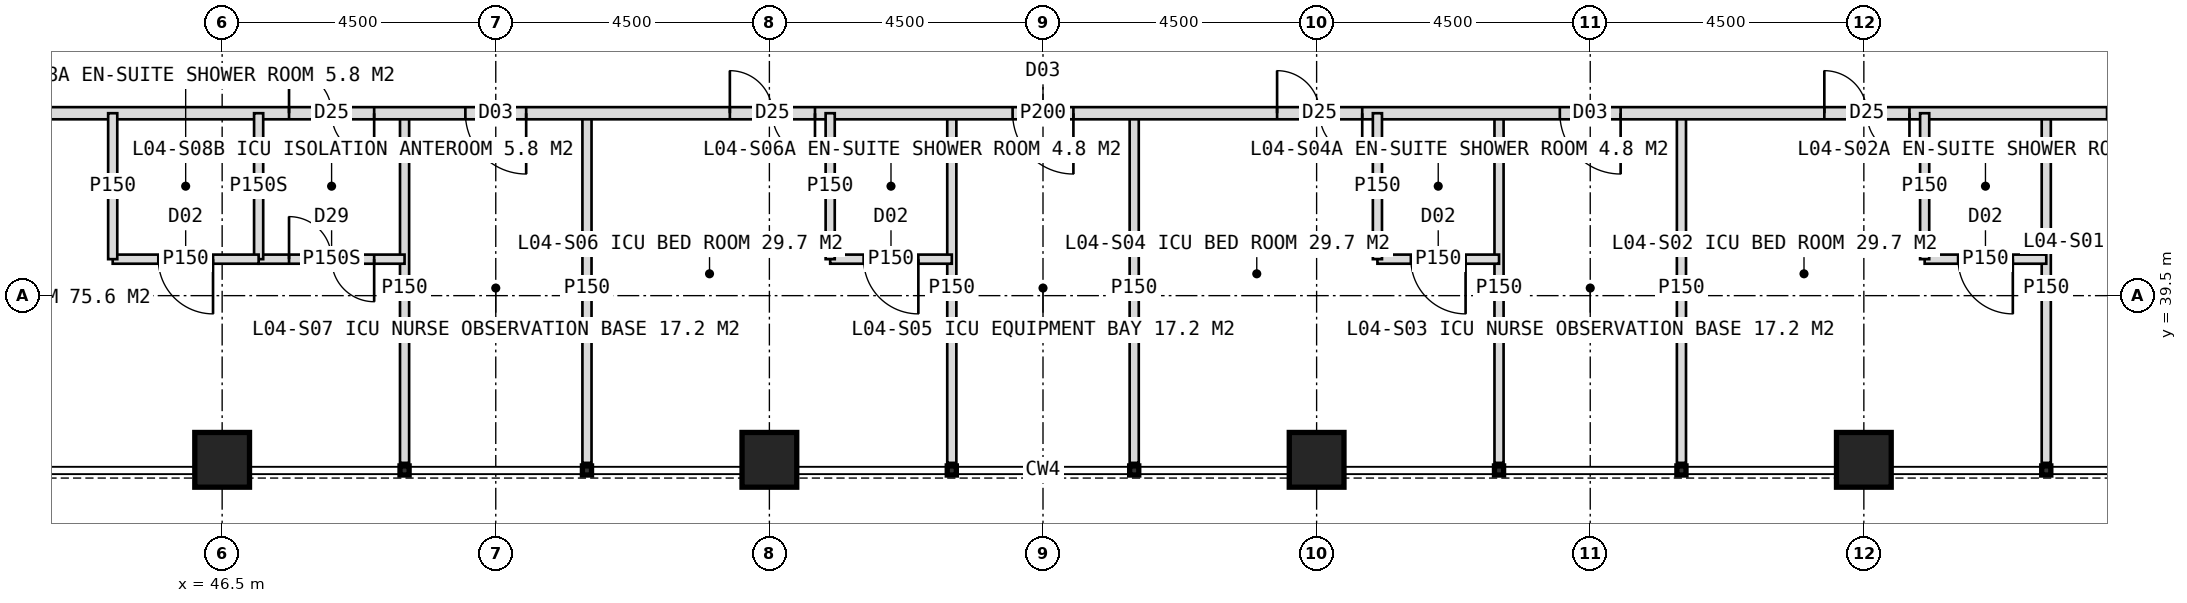
"""IFC4 building model, lengths in metres.
Left out: names, types, materials, properties, quantities, classifications, styles, units other than length and angle.
Written with IfcOpenShell. Run it as: python <this file> out.ifc"""

import sys

from ifc_helpers import new_model, si_unit, direction, frame, frame_2d, origin, origin_2d, place, context, subcontext, project, spatial, rectangle, hollow_rectangle, extrude, element, fill, save


model = new_model("IFC4")
c1 = context("Model", 3, precision=1e-05, world=origin(), true_north=direction((0.0, 1.0)))
c2 = subcontext(c1, "Body", "Model", "MODEL_VIEW")
j1 = project(units=[si_unit("LENGTHUNIT", "METRE"), si_unit("PLANEANGLEUNIT", "RADIAN")], contexts=[c1])
p1 = place(None, origin())
s1 = spatial("IfcSite", under=j1, at=p1, CompositionType="ELEMENT")
p2 = place(p1, origin())
s2 = spatial("IfcBuilding", under=s1, at=p2, CompositionType="ELEMENT")
p3 = place(p2, frame((0.0, 0.0, 21.0)))
s3 = spatial("IfcBuildingStorey", under=s2, at=p3, CompositionType="ELEMENT", Elevation=21.0)
for number, where, z_axis, x_axis in (
    (1, (46.5, 36.8, 0.0), (0.0, 0.0, 1.0), (1.0, 0.0, 0.0)),
    (2, (55.5, 36.8, 0.0), (0.0, 0.0, 1.0), (1.0, 0.0, 0.0)),
    (3, (64.5, 36.8, 0.0), (0.0, 0.0, 1.0), (1.0, 0.0, 0.0)),
    (4, (73.5, 36.8, 0.0), (0.0, 0.0, 1.0), (1.0, 0.0, 0.0)),
):
    element("IfcColumn", number, at=place(p3, frame(where, z_axis=z_axis, x_axis=x_axis)), inside=s3, PredefinedType="COLUMN", context=c2, shape_type="SweptSolid", body=[
        extrude(hollow_rectangle(XDim=0.9, YDim=0.9, WallThickness=0.08, at=origin_2d()), origin(), (0.0, 0.0, 1.0), 5.0),
    ])
for number, where, z_axis, x_axis in (
    (5, (76.5, 42.5, 0.0), (0.0, 0.0, 1.0), (0.0, -1.0, 0.0)),
    (6, (70.5, 42.5, 0.0), (0.0, 0.0, 1.0), (0.0, -1.0, 0.0)),
    (7, (67.5, 42.5, 0.0), (0.0, 0.0, 1.0), (0.0, -1.0, 0.0)),
    (8, (61.5, 42.5, 0.0), (0.0, 0.0, 1.0), (0.0, -1.0, 0.0)),
    (9, (58.5, 42.5, 0.0), (0.0, 0.0, 1.0), (0.0, -1.0, 0.0)),
    (10, (52.5, 42.5, 0.0), (0.0, 0.0, 1.0), (0.0, -1.0, 0.0)),
    (11, (49.5, 42.5, 0.0), (0.0, 0.0, 1.0), (0.0, -1.0, 0.0)),
):
    element("IfcWall", number, at=place(p3, frame(where, z_axis=z_axis, x_axis=x_axis)), inside=s3, PredefinedType="PARTITIONING", context=c2, shape_type="SweptSolid", body=[
        extrude(rectangle(XDim=5.75, YDim=0.15, at=frame_2d((2.875, 0.0))), origin(), (0.0, 0.0, 1.0), 4.7),
    ])
p4 = place(p3, frame((79.5, 42.5, 0.0), z_axis=(0.0, 0.0, 1.0), x_axis=(-1.0, 0.0, 0.0)))
e12 = element("IfcWall", 12, at=p4, inside=s3, PredefinedType="PARTITIONING", context=c2, shape_type="SweptSolid", body=[
    extrude(rectangle(XDim=39.0, YDim=0.2, at=frame_2d((19.5, 0.0))), origin(), (0.0, 0.0, 1.0), 4.7),
])
p5 = place(p4, frame((1.0, 0.0, 0.0)))
e13 = element("IfcOpeningElement", 13, at=p5, cuts=e12, PredefinedType="OPENING", context=c2, shape_type="SweptSolid", body=[
    extrude(rectangle(XDim=1.0, YDim=2.1, at=frame_2d((0.5, 1.05))), frame((0.0, 0.11, 0.0), z_axis=(0.0, -1.0, 0.0), x_axis=(1.0, 0.0, 0.0)), (0.0, 0.0, 1.0), 0.22),
])
p6 = place(p4, frame((5.25, 0.0, 0.0)))
e14 = element("IfcOpeningElement", 14, at=p6, cuts=e12, PredefinedType="OPENING", context=c2, shape_type="SweptSolid", body=[
    extrude(rectangle(XDim=1.4, YDim=2.2, at=frame_2d((0.7, 1.1))), frame((0.0, 0.11, 0.0), z_axis=(0.0, -1.0, 0.0), x_axis=(1.0, 0.0, 0.0)), (0.0, 0.0, 1.0), 0.22),
])
p7 = place(p4, frame((10.0, 0.0, 0.0)))
e15 = element("IfcOpeningElement", 15, at=p7, cuts=e12, PredefinedType="OPENING", context=c2, shape_type="SweptSolid", body=[
    extrude(rectangle(XDim=1.0, YDim=2.1, at=frame_2d((0.5, 1.05))), frame((0.0, 0.11, 0.0), z_axis=(0.0, -1.0, 0.0), x_axis=(1.0, 0.0, 0.0)), (0.0, 0.0, 1.0), 0.22),
])
p8 = place(p4, frame((14.25, 0.0, 0.0)))
e16 = element("IfcOpeningElement", 16, at=p8, cuts=e12, PredefinedType="OPENING", context=c2, shape_type="SweptSolid", body=[
    extrude(rectangle(XDim=1.4, YDim=2.2, at=frame_2d((0.7, 1.1))), frame((0.0, 0.11, 0.0), z_axis=(0.0, -1.0, 0.0), x_axis=(1.0, 0.0, 0.0)), (0.0, 0.0, 1.0), 0.22),
])
p9 = place(p4, frame((19.0, 0.0, 0.0)))
e17 = element("IfcOpeningElement", 17, at=p9, cuts=e12, PredefinedType="OPENING", context=c2, shape_type="SweptSolid", body=[
    extrude(rectangle(XDim=1.0, YDim=2.1, at=frame_2d((0.5, 1.05))), frame((0.0, 0.11, 0.0), z_axis=(0.0, -1.0, 0.0), x_axis=(1.0, 0.0, 0.0)), (0.0, 0.0, 1.0), 0.22),
])
p10 = place(p4, frame((23.25, 0.0, 0.0)))
e18 = element("IfcOpeningElement", 18, at=p10, cuts=e12, PredefinedType="OPENING", context=c2, shape_type="SweptSolid", body=[
    extrude(rectangle(XDim=1.4, YDim=2.2, at=frame_2d((0.7, 1.1))), frame((0.0, 0.11, 0.0), z_axis=(0.0, -1.0, 0.0), x_axis=(1.0, 0.0, 0.0)), (0.0, 0.0, 1.0), 0.22),
])
p11 = place(p4, frame((28.0, 0.0, 0.0)))
e19 = element("IfcOpeningElement", 19, at=p11, cuts=e12, PredefinedType="OPENING", context=c2, shape_type="SweptSolid", body=[
    extrude(rectangle(XDim=1.0, YDim=2.1, at=frame_2d((0.5, 1.05))), frame((0.0, 0.11, 0.0), z_axis=(0.0, -1.0, 0.0), x_axis=(1.0, 0.0, 0.0)), (0.0, 0.0, 1.0), 0.22),
])
p12 = place(p4, frame((30.5, 0.0, 0.0)))
e20 = element("IfcOpeningElement", 20, at=p12, cuts=e12, PredefinedType="OPENING", context=c2, shape_type="SweptSolid", body=[
    extrude(rectangle(XDim=1.4, YDim=2.2, at=frame_2d((0.7, 1.1))), frame((0.0, 0.11, 0.0), z_axis=(0.0, -1.0, 0.0), x_axis=(1.0, 0.0, 0.0)), (0.0, 0.0, 1.0), 0.22),
])
p13 = place(p3, frame((76.5, 40.1, 0.0), z_axis=(0.0, 0.0, 1.0), x_axis=(-1.0, 0.0, 0.0)))
e21 = element("IfcWall", 21, at=p13, inside=s3, PredefinedType="PARTITIONING", context=c2, shape_type="SweptSolid", body=[
    extrude(rectangle(XDim=2.0, YDim=0.15, at=frame_2d((1.0, 0.0))), origin(), (0.0, 0.0, 1.0), 4.7),
])
p14 = place(p13, frame((0.55, 0.0, 0.0)))
e22 = element("IfcOpeningElement", 22, at=p14, cuts=e21, PredefinedType="OPENING", context=c2, shape_type="SweptSolid", body=[
    extrude(rectangle(XDim=0.9, YDim=2.1, at=frame_2d((0.45, 1.05))), frame((0.0, 0.085, 0.0), z_axis=(0.0, -1.0, 0.0), x_axis=(1.0, 0.0, 0.0)), (0.0, 0.0, 1.0), 0.17),
])
p15 = place(p3, frame((74.5, 42.5, 0.0), z_axis=(0.0, 0.0, 1.0), x_axis=(0.0, -1.0, 0.0)))
e23 = element("IfcWall", 23, at=p15, inside=s3, PredefinedType="PARTITIONING", context=c2, shape_type="SweptSolid", body=[
    extrude(rectangle(XDim=2.4, YDim=0.15, at=frame_2d((1.2, 0.0))), origin(), (0.0, 0.0, 1.0), 4.7),
])
p16 = place(p3, frame((67.5, 40.1, 0.0), z_axis=(0.0, 0.0, 1.0), x_axis=(-1.0, 0.0, 0.0)))
e24 = element("IfcWall", 24, at=p16, inside=s3, PredefinedType="PARTITIONING", context=c2, shape_type="SweptSolid", body=[
    extrude(rectangle(XDim=2.0, YDim=0.15, at=frame_2d((1.0, 0.0))), origin(), (0.0, 0.0, 1.0), 4.7),
])
p17 = place(p16, frame((0.55, 0.0, 0.0)))
e25 = element("IfcOpeningElement", 25, at=p17, cuts=e24, PredefinedType="OPENING", context=c2, shape_type="SweptSolid", body=[
    extrude(rectangle(XDim=0.9, YDim=2.1, at=frame_2d((0.45, 1.05))), frame((0.0, 0.085, 0.0), z_axis=(0.0, -1.0, 0.0), x_axis=(1.0, 0.0, 0.0)), (0.0, 0.0, 1.0), 0.17),
])
p18 = place(p3, frame((65.5, 42.5, 0.0), z_axis=(0.0, 0.0, 1.0), x_axis=(0.0, -1.0, 0.0)))
e26 = element("IfcWall", 26, at=p18, inside=s3, PredefinedType="PARTITIONING", context=c2, shape_type="SweptSolid", body=[
    extrude(rectangle(XDim=2.4, YDim=0.15, at=frame_2d((1.2, 0.0))), origin(), (0.0, 0.0, 1.0), 4.7),
])
p19 = place(p3, frame((58.5, 40.1, 0.0), z_axis=(0.0, 0.0, 1.0), x_axis=(-1.0, 0.0, 0.0)))
e27 = element("IfcWall", 27, at=p19, inside=s3, PredefinedType="PARTITIONING", context=c2, shape_type="SweptSolid", body=[
    extrude(rectangle(XDim=2.0, YDim=0.15, at=frame_2d((1.0, 0.0))), origin(), (0.0, 0.0, 1.0), 4.7),
])
p20 = place(p19, frame((0.55, 0.0, 0.0)))
e28 = element("IfcOpeningElement", 28, at=p20, cuts=e27, PredefinedType="OPENING", context=c2, shape_type="SweptSolid", body=[
    extrude(rectangle(XDim=0.9, YDim=2.1, at=frame_2d((0.45, 1.05))), frame((0.0, 0.085, 0.0), z_axis=(0.0, -1.0, 0.0), x_axis=(1.0, 0.0, 0.0)), (0.0, 0.0, 1.0), 0.17),
])
p21 = place(p3, frame((56.5, 42.5, 0.0), z_axis=(0.0, 0.0, 1.0), x_axis=(0.0, -1.0, 0.0)))
e29 = element("IfcWall", 29, at=p21, inside=s3, PredefinedType="PARTITIONING", context=c2, shape_type="SweptSolid", body=[
    extrude(rectangle(XDim=2.4, YDim=0.15, at=frame_2d((1.2, 0.0))), origin(), (0.0, 0.0, 1.0), 4.7),
])
p22 = place(p3, frame((49.5, 40.1, 0.0), z_axis=(0.0, 0.0, 1.0), x_axis=(-1.0, 0.0, 0.0)))
e30 = element("IfcWall", 30, at=p22, inside=s3, PredefinedType="PARTITIONING", context=c2, shape_type="SweptSolid", body=[
    extrude(rectangle(XDim=2.4, YDim=0.15, at=frame_2d((1.2, 0.0))), origin(), (0.0, 0.0, 1.0), 4.7),
])
p23 = place(p22, frame((0.5, 0.0, 0.0)))
e31 = element("IfcOpeningElement", 31, at=p23, cuts=e30, PredefinedType="OPENING", context=c2, shape_type="SweptSolid", body=[
    extrude(rectangle(XDim=1.4, YDim=2.2, at=frame_2d((0.7, 1.1))), frame((0.0, 0.085, 0.0), z_axis=(0.0, -1.0, 0.0), x_axis=(1.0, 0.0, 0.0)), (0.0, 0.0, 1.0), 0.17),
])
p24 = place(p3, frame((47.1, 42.5, 0.0), z_axis=(0.0, 0.0, 1.0), x_axis=(0.0, -1.0, 0.0)))
e32 = element("IfcWall", 32, at=p24, inside=s3, PredefinedType="PARTITIONING", context=c2, shape_type="SweptSolid", body=[
    extrude(rectangle(XDim=2.4, YDim=0.15, at=frame_2d((1.2, 0.0))), origin(), (0.0, 0.0, 1.0), 4.7),
])
p25 = place(p3, frame((47.1, 40.1, 0.0), z_axis=(0.0, 0.0, 1.0), x_axis=(-1.0, 0.0, 0.0)))
e33 = element("IfcWall", 33, at=p25, inside=s3, PredefinedType="PARTITIONING", context=c2, shape_type="SweptSolid", body=[
    extrude(rectangle(XDim=2.4, YDim=0.15, at=frame_2d((1.2, 0.0))), origin(), (0.0, 0.0, 1.0), 4.7),
])
p26 = place(p25, frame((0.75, 0.0, 0.0)))
e34 = element("IfcOpeningElement", 34, at=p26, cuts=e33, PredefinedType="OPENING", context=c2, shape_type="SweptSolid", body=[
    extrude(rectangle(XDim=0.9, YDim=2.1, at=frame_2d((0.45, 1.05))), frame((0.0, 0.085, 0.0), z_axis=(0.0, -1.0, 0.0), x_axis=(1.0, 0.0, 0.0)), (0.0, 0.0, 1.0), 0.17),
])
p27 = place(p3, frame((44.7, 42.5, 0.0), z_axis=(0.0, 0.0, 1.0), x_axis=(0.0, -1.0, 0.0)))
e35 = element("IfcWall", 35, at=p27, inside=s3, PredefinedType="PARTITIONING", context=c2, shape_type="SweptSolid", body=[
    extrude(rectangle(XDim=2.4, YDim=0.15, at=frame_2d((1.2, 0.0))), origin(), (0.0, 0.0, 1.0), 4.7),
])
p28 = place(p14, origin())
e36 = element("IfcDoor", 36, at=p28, inside=s3, OperationType="SINGLE_SWING_LEFT", PredefinedType="DOOR", context=c2, shape_type="SweptSolid", body=[
    extrude(rectangle(XDim=0.9, YDim=2.1, at=frame_2d((0.45, 1.05))), frame((0.0, 0.025, 0.0), z_axis=(0.0, -1.0, 0.0), x_axis=(1.0, 0.0, 0.0)), (0.0, 0.0, 1.0), 0.05),
])
fill(e22, e36)
p29 = place(p6, origin())
e37 = element("IfcDoor", 37, at=p29, inside=s3, OperationType="DOUBLE_DOOR_SINGLE_SWING", PredefinedType="DOOR", context=c2, shape_type="SweptSolid", body=[
    extrude(rectangle(XDim=1.4, YDim=2.2, at=frame_2d((0.7, 1.1))), frame((0.0, 0.025, 0.0), z_axis=(0.0, -1.0, 0.0), x_axis=(1.0, 0.0, 0.0)), (0.0, 0.0, 1.0), 0.05),
])
fill(e14, e37)
p30 = place(p7, origin())
e38 = element("IfcDoor", 38, at=p30, inside=s3, OperationType="SINGLE_SWING_LEFT", PredefinedType="DOOR", context=c2, shape_type="SweptSolid", body=[
    extrude(rectangle(XDim=1.0, YDim=2.1, at=frame_2d((0.5, 1.05))), frame((0.0, 0.025, 0.0), z_axis=(0.0, -1.0, 0.0), x_axis=(1.0, 0.0, 0.0)), (0.0, 0.0, 1.0), 0.05),
])
fill(e15, e38)
p31 = place(p17, origin())
e39 = element("IfcDoor", 39, at=p31, inside=s3, OperationType="SINGLE_SWING_LEFT", PredefinedType="DOOR", context=c2, shape_type="SweptSolid", body=[
    extrude(rectangle(XDim=0.9, YDim=2.1, at=frame_2d((0.45, 1.05))), frame((0.0, 0.025, 0.0), z_axis=(0.0, -1.0, 0.0), x_axis=(1.0, 0.0, 0.0)), (0.0, 0.0, 1.0), 0.05),
])
fill(e25, e39)
p32 = place(p8, origin())
e40 = element("IfcDoor", 40, at=p32, inside=s3, OperationType="DOUBLE_DOOR_SINGLE_SWING", PredefinedType="DOOR", context=c2, shape_type="SweptSolid", body=[
    extrude(rectangle(XDim=1.4, YDim=2.2, at=frame_2d((0.7, 1.1))), frame((0.0, 0.025, 0.0), z_axis=(0.0, -1.0, 0.0), x_axis=(1.0, 0.0, 0.0)), (0.0, 0.0, 1.0), 0.05),
])
fill(e16, e40)
p33 = place(p9, origin())
e41 = element("IfcDoor", 41, at=p33, inside=s3, OperationType="SINGLE_SWING_LEFT", PredefinedType="DOOR", context=c2, shape_type="SweptSolid", body=[
    extrude(rectangle(XDim=1.0, YDim=2.1, at=frame_2d((0.5, 1.05))), frame((0.0, 0.025, 0.0), z_axis=(0.0, -1.0, 0.0), x_axis=(1.0, 0.0, 0.0)), (0.0, 0.0, 1.0), 0.05),
])
fill(e17, e41)
p34 = place(p20, origin())
e42 = element("IfcDoor", 42, at=p34, inside=s3, OperationType="SINGLE_SWING_LEFT", PredefinedType="DOOR", context=c2, shape_type="SweptSolid", body=[
    extrude(rectangle(XDim=0.9, YDim=2.1, at=frame_2d((0.45, 1.05))), frame((0.0, 0.025, 0.0), z_axis=(0.0, -1.0, 0.0), x_axis=(1.0, 0.0, 0.0)), (0.0, 0.0, 1.0), 0.05),
])
fill(e28, e42)
p35 = place(p10, origin())
e43 = element("IfcDoor", 43, at=p35, inside=s3, OperationType="DOUBLE_DOOR_SINGLE_SWING", PredefinedType="DOOR", context=c2, shape_type="SweptSolid", body=[
    extrude(rectangle(XDim=1.4, YDim=2.2, at=frame_2d((0.7, 1.1))), frame((0.0, 0.025, 0.0), z_axis=(0.0, -1.0, 0.0), x_axis=(1.0, 0.0, 0.0)), (0.0, 0.0, 1.0), 0.05),
])
fill(e18, e43)
p36 = place(p11, origin())
e44 = element("IfcDoor", 44, at=p36, inside=s3, OperationType="SINGLE_SWING_LEFT", PredefinedType="DOOR", context=c2, shape_type="SweptSolid", body=[
    extrude(rectangle(XDim=1.0, YDim=2.1, at=frame_2d((0.5, 1.05))), frame((0.0, 0.025, 0.0), z_axis=(0.0, -1.0, 0.0), x_axis=(1.0, 0.0, 0.0)), (0.0, 0.0, 1.0), 0.05),
])
fill(e19, e44)
p37 = place(p23, origin())
e45 = element("IfcDoor", 45, at=p37, inside=s3, OperationType="DOUBLE_DOOR_SINGLE_SWING", PredefinedType="DOOR", context=c2, shape_type="SweptSolid", body=[
    extrude(rectangle(XDim=1.4, YDim=2.2, at=frame_2d((0.7, 1.1))), frame((0.0, 0.025, 0.0), z_axis=(0.0, -1.0, 0.0), x_axis=(1.0, 0.0, 0.0)), (0.0, 0.0, 1.0), 0.05),
])
fill(e31, e45)
p38 = place(p12, origin())
e46 = element("IfcDoor", 46, at=p38, inside=s3, OperationType="DOUBLE_DOOR_SINGLE_SWING", PredefinedType="DOOR", context=c2, shape_type="SweptSolid", body=[
    extrude(rectangle(XDim=1.4, YDim=2.2, at=frame_2d((0.7, 1.1))), frame((0.0, 0.025, 0.0), z_axis=(0.0, -1.0, 0.0), x_axis=(1.0, 0.0, 0.0)), (0.0, 0.0, 1.0), 0.05),
])
fill(e20, e46)
p39 = place(p26, origin())
e47 = element("IfcDoor", 47, at=p39, inside=s3, OperationType="SINGLE_SWING_LEFT", PredefinedType="DOOR", context=c2, shape_type="SweptSolid", body=[
    extrude(rectangle(XDim=0.9, YDim=2.1, at=frame_2d((0.45, 1.05))), frame((0.0, 0.025, 0.0), z_axis=(0.0, -1.0, 0.0), x_axis=(1.0, 0.0, 0.0)), (0.0, 0.0, 1.0), 0.05),
])
fill(e34, e47)
save(model, sys.argv[1])
